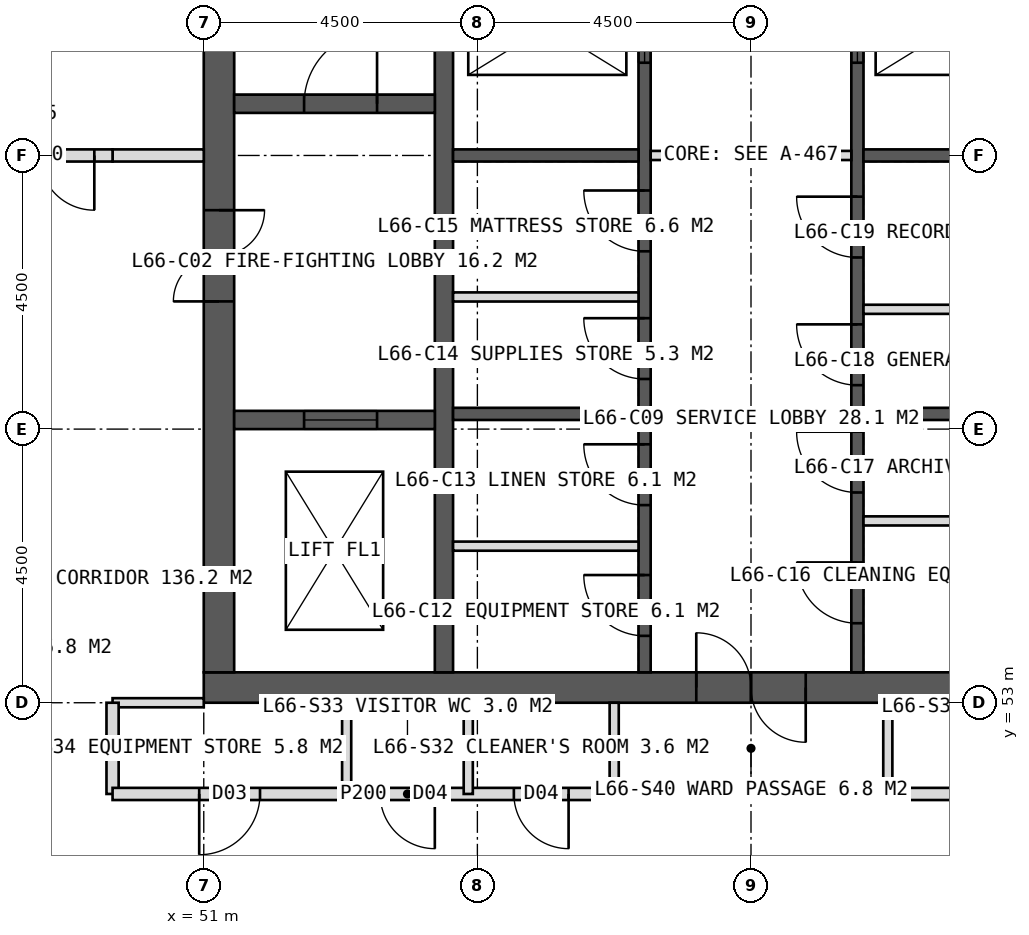
"""IFC4 building model, lengths in metres.
Left out: names, types, materials, properties, quantities, classifications, styles, units other than length and angle.
Written with IfcOpenShell. Run it as: python <this file> out.ifc"""

import sys

from ifc_helpers import new_model, si_unit, direction, frame, frame_2d, origin, place, context, subcontext, project, spatial, rectangle, extrude, element, fill, save


model = new_model("IFC4")
c1 = context("Model", 3, precision=1e-05, world=origin(), true_north=direction((0.0, 1.0)))
c2 = subcontext(c1, "Body", "Model", "MODEL_VIEW")
j1 = project(units=[si_unit("LENGTHUNIT", "METRE"), si_unit("PLANEANGLEUNIT", "RADIAN")], contexts=[c1])
p1 = place(None, origin())
s1 = spatial("IfcSite", under=j1, at=p1, CompositionType="ELEMENT")
p2 = place(p1, origin())
s2 = spatial("IfcBuilding", under=s1, at=p2, CompositionType="ELEMENT")
p3 = place(p2, frame((0.0, 0.0, 274.0)))
s3 = spatial("IfcBuildingStorey", under=s2, at=p3, CompositionType="ELEMENT", Elevation=274.0)
p4 = place(p3, frame((51.0, 53.25, 0.0), z_axis=(0.0, 0.0, 1.0), x_axis=(1.0, 0.0, 0.0)))
e1 = element("IfcWall", 1, at=p4, inside=s3, PredefinedType="SHEAR", context=c2, shape_type="SweptSolid", body=[
    extrude(rectangle(XDim=18.0, YDim=0.5, at=frame_2d((9.0, 0.0))), origin(), (0.0, 0.0, 1.0), 4.0),
])
p5 = place(p4, frame((8.1, 0.0, 0.0)))
e2 = element("IfcOpeningElement", 2, at=p5, cuts=e1, PredefinedType="OPENING", context=c2, shape_type="SweptSolid", body=[
    extrude(rectangle(XDim=1.8, YDim=2.2, at=frame_2d((0.9, 1.1))), frame((0.0, 0.26, 0.0), z_axis=(0.0, -1.0, 0.0), x_axis=(1.0, 0.0, 0.0)), (0.0, 0.0, 1.0), 0.52),
])
p6 = place(p3, frame((51.25, 53.5, 0.0), z_axis=(0.0, 0.0, 1.0), x_axis=(0.0, 1.0, 0.0)))
e3 = element("IfcWall", 3, at=p6, inside=s3, PredefinedType="SHEAR", context=c2, shape_type="SweptSolid", body=[
    extrude(rectangle(XDim=17.0, YDim=0.5, at=frame_2d((8.5, 0.0))), origin(), (0.0, 0.0, 1.0), 4.0),
])
p7 = place(p6, frame((6.1, 0.0, 0.0)))
e4 = element("IfcOpeningElement", 4, at=p7, cuts=e3, PredefinedType="OPENING", context=c2, shape_type="SweptSolid", body=[
    extrude(rectangle(XDim=1.5, YDim=2.2, at=frame_2d((0.75, 1.1))), frame((0.0, 0.26, 0.0), z_axis=(0.0, -1.0, 0.0), x_axis=(1.0, 0.0, 0.0)), (0.0, 0.0, 1.0), 0.52),
])
p8 = place(p3, frame((54.95, 53.5, 0.0), z_axis=(0.0, 0.0, 1.0), x_axis=(0.0, 1.0, 0.0)))
e5 = element("IfcWall", 5, at=p8, inside=s3, PredefinedType="SHEAR", context=c2, shape_type="SweptSolid", body=[
    extrude(rectangle(XDim=17.0, YDim=0.3, at=frame_2d((8.5, 0.0))), origin(), (0.0, 0.0, 1.0), 4.0),
])
p9 = place(p3, frame((58.25, 53.5, 0.0), z_axis=(0.0, 0.0, 1.0), x_axis=(0.0, 1.0, 0.0)))
e6 = element("IfcWall", 6, at=p9, inside=s3, PredefinedType="SHEAR", context=c2, shape_type="SweptSolid", body=[
    extrude(rectangle(XDim=17.0, YDim=0.2, at=frame_2d((8.5, 0.0))), origin(), (0.0, 0.0, 1.0), 4.0),
])
p10 = place(p9, frame((0.6, 0.0, 0.0)))
e7 = element("IfcOpeningElement", 7, at=p10, cuts=e6, PredefinedType="OPENING", context=c2, shape_type="SweptSolid", body=[
    extrude(rectangle(XDim=1.0, YDim=2.1, at=frame_2d((0.5, 1.05))), frame((0.0, 0.11, 0.0), z_axis=(0.0, -1.0, 0.0), x_axis=(1.0, 0.0, 0.0)), (0.0, 0.0, 1.0), 0.22),
])
p11 = place(p9, frame((2.75, 0.0, 0.0)))
e8 = element("IfcOpeningElement", 8, at=p11, cuts=e6, PredefinedType="OPENING", context=c2, shape_type="SweptSolid", body=[
    extrude(rectangle(XDim=1.0, YDim=2.1, at=frame_2d((0.5, 1.05))), frame((0.0, 0.11, 0.0), z_axis=(0.0, -1.0, 0.0), x_axis=(1.0, 0.0, 0.0)), (0.0, 0.0, 1.0), 0.22),
])
p12 = place(p9, frame((4.824, 0.0, 0.0)))
e9 = element("IfcOpeningElement", 9, at=p12, cuts=e6, PredefinedType="OPENING", context=c2, shape_type="SweptSolid", body=[
    extrude(rectangle(XDim=1.0, YDim=2.1, at=frame_2d((0.5, 1.05))), frame((0.0, 0.11, 0.0), z_axis=(0.0, -1.0, 0.0), x_axis=(1.0, 0.0, 0.0)), (0.0, 0.0, 1.0), 0.22),
])
p13 = place(p9, frame((6.924, 0.0, 0.0)))
e10 = element("IfcOpeningElement", 10, at=p13, cuts=e6, PredefinedType="OPENING", context=c2, shape_type="SweptSolid", body=[
    extrude(rectangle(XDim=1.0, YDim=2.1, at=frame_2d((0.5, 1.05))), frame((0.0, 0.11, 0.0), z_axis=(0.0, -1.0, 0.0), x_axis=(1.0, 0.0, 0.0)), (0.0, 0.0, 1.0), 0.22),
])
p14 = place(p9, frame((10.025, 0.0, 0.0)))
e11 = element("IfcOpeningElement", 11, at=p14, cuts=e6, PredefinedType="OPENING", context=c2, shape_type="SweptSolid", body=[
    extrude(rectangle(XDim=1.4, YDim=2.2, at=frame_2d((0.7, 1.1))), frame((0.0, 0.11, 0.0), z_axis=(0.0, -1.0, 0.0), x_axis=(1.0, 0.0, 0.0)), (0.0, 0.0, 1.0), 0.22),
])
p15 = place(p9, frame((14.325, 0.0, 0.0)))
e12 = element("IfcOpeningElement", 12, at=p15, cuts=e6, PredefinedType="OPENING", context=c2, shape_type="SweptSolid", body=[
    extrude(rectangle(XDim=1.4, YDim=2.2, at=frame_2d((0.7, 1.1))), frame((0.0, 0.11, 0.0), z_axis=(0.0, -1.0, 0.0), x_axis=(1.0, 0.0, 0.0)), (0.0, 0.0, 1.0), 0.22),
])
p16 = place(p3, frame((61.75, 53.5, 0.0), z_axis=(0.0, 0.0, 1.0), x_axis=(0.0, 1.0, 0.0)))
e13 = element("IfcWall", 13, at=p16, inside=s3, PredefinedType="SHEAR", context=c2, shape_type="SweptSolid", body=[
    extrude(rectangle(XDim=17.0, YDim=0.2, at=frame_2d((8.5, 0.0))), origin(), (0.0, 0.0, 1.0), 4.0),
])
p17 = place(p16, frame((0.808, 0.0, 0.0)))
e14 = element("IfcOpeningElement", 14, at=p17, cuts=e13, PredefinedType="OPENING", context=c2, shape_type="SweptSolid", body=[
    extrude(rectangle(XDim=1.0, YDim=2.1, at=frame_2d((0.5, 1.05))), frame((0.0, 0.11, 0.0), z_axis=(0.0, -1.0, 0.0), x_axis=(1.0, 0.0, 0.0)), (0.0, 0.0, 1.0), 0.22),
])
p18 = place(p16, frame((2.958, 0.0, 0.0)))
e15 = element("IfcOpeningElement", 15, at=p18, cuts=e13, PredefinedType="OPENING", context=c2, shape_type="SweptSolid", body=[
    extrude(rectangle(XDim=1.0, YDim=2.1, at=frame_2d((0.5, 1.05))), frame((0.0, 0.11, 0.0), z_axis=(0.0, -1.0, 0.0), x_axis=(1.0, 0.0, 0.0)), (0.0, 0.0, 1.0), 0.22),
])
p19 = place(p16, frame((4.722, 0.0, 0.0)))
e16 = element("IfcOpeningElement", 16, at=p19, cuts=e13, PredefinedType="OPENING", context=c2, shape_type="SweptSolid", body=[
    extrude(rectangle(XDim=1.0, YDim=2.1, at=frame_2d((0.5, 1.05))), frame((0.0, 0.11, 0.0), z_axis=(0.0, -1.0, 0.0), x_axis=(1.0, 0.0, 0.0)), (0.0, 0.0, 1.0), 0.22),
])
p20 = place(p16, frame((6.823, 0.0, 0.0)))
e17 = element("IfcOpeningElement", 17, at=p20, cuts=e13, PredefinedType="OPENING", context=c2, shape_type="SweptSolid", body=[
    extrude(rectangle(XDim=1.0, YDim=2.1, at=frame_2d((0.5, 1.05))), frame((0.0, 0.11, 0.0), z_axis=(0.0, -1.0, 0.0), x_axis=(1.0, 0.0, 0.0)), (0.0, 0.0, 1.0), 0.22),
])
p21 = place(p16, frame((10.025, 0.0, 0.0)))
e18 = element("IfcOpeningElement", 18, at=p21, cuts=e13, PredefinedType="OPENING", context=c2, shape_type="SweptSolid", body=[
    extrude(rectangle(XDim=1.4, YDim=2.2, at=frame_2d((0.7, 1.1))), frame((0.0, 0.11, 0.0), z_axis=(0.0, -1.0, 0.0), x_axis=(1.0, 0.0, 0.0)), (0.0, 0.0, 1.0), 0.22),
])
p22 = place(p16, frame((14.325, 0.0, 0.0)))
e19 = element("IfcOpeningElement", 19, at=p22, cuts=e13, PredefinedType="OPENING", context=c2, shape_type="SweptSolid", body=[
    extrude(rectangle(XDim=1.4, YDim=2.2, at=frame_2d((0.7, 1.1))), frame((0.0, 0.11, 0.0), z_axis=(0.0, -1.0, 0.0), x_axis=(1.0, 0.0, 0.0)), (0.0, 0.0, 1.0), 0.22),
])
for number, where, z_axis, x_axis in (
    (20, (55.1, 57.75, 0.0), (0.0, 0.0, 1.0), (1.0, 0.0, 0.0)),
    (21, (61.85, 57.75, 0.0), (0.0, 0.0, 1.0), (1.0, 0.0, 0.0)),
    (22, (55.1, 62.0, 0.0), (0.0, 0.0, 1.0), (1.0, 0.0, 0.0)),
    (23, (61.85, 62.0, 0.0), (0.0, 0.0, 1.0), (1.0, 0.0, 0.0)),
):
    element("IfcWall", number, at=place(p3, frame(where, z_axis=z_axis, x_axis=x_axis)), inside=s3, PredefinedType="SHEAR", context=c2, shape_type="SweptSolid", body=[
        extrude(rectangle(XDim=3.05, YDim=0.2, at=frame_2d((1.525, 0.0))), origin(), (0.0, 0.0, 1.0), 4.0),
    ])
p23 = place(p3, frame((51.5, 62.85, 0.0), z_axis=(0.0, 0.0, 1.0), x_axis=(1.0, 0.0, 0.0)))
e24 = element("IfcWall", 24, at=p23, inside=s3, PredefinedType="SHEAR", context=c2, shape_type="SweptSolid", body=[
    extrude(rectangle(XDim=3.3, YDim=0.3, at=frame_2d((1.65, 0.0))), origin(), (0.0, 0.0, 1.0), 4.0),
])
p24 = place(p23, frame((1.15, 0.0, 0.0)))
e25 = element("IfcOpeningElement", 25, at=p24, cuts=e24, PredefinedType="OPENING", context=c2, shape_type="SweptSolid", body=[
    extrude(rectangle(XDim=1.2, YDim=2.1, at=frame_2d((0.6, 1.05))), frame((0.0, 0.16, 0.0), z_axis=(0.0, -1.0, 0.0), x_axis=(1.0, 0.0, 0.0)), (0.0, 0.0, 1.0), 0.32),
])
p25 = place(p3, frame((51.5, 57.65, 0.0), z_axis=(0.0, 0.0, 1.0), x_axis=(1.0, 0.0, 0.0)))
e26 = element("IfcWall", 26, at=p25, inside=s3, PredefinedType="SHEAR", context=c2, shape_type="SweptSolid", body=[
    extrude(rectangle(XDim=3.3, YDim=0.3, at=frame_2d((1.65, 0.0))), origin(), (0.0, 0.0, 1.0), 4.0),
])
p26 = place(p25, frame((1.15, 0.0, 0.0)))
e27 = element("IfcOpeningElement", 27, at=p26, cuts=e26, PredefinedType="OPENING", context=c2, shape_type="SweptSolid", body=[
    extrude(rectangle(XDim=1.2, YDim=2.2, at=frame_2d((0.6, 1.1))), frame((0.0, 0.16, 0.0), z_axis=(0.0, -1.0, 0.0), x_axis=(1.0, 0.0, 0.0)), (0.0, 0.0, 1.0), 0.32),
])
p27 = place(p3, frame((51.0, 53.0, 0.0), z_axis=(0.0, 0.0, 1.0), x_axis=(-1.0, 0.0, 0.0)))
e28 = element("IfcWall", 28, at=p27, inside=s3, PredefinedType="PARTITIONING", context=c2, shape_type="SweptSolid", body=[
    extrude(rectangle(XDim=1.5, YDim=0.15, at=frame_2d((0.75, 0.0))), origin(), (0.0, 0.0, 1.0), 3.75),
])
p28 = place(p3, frame((51.0, 62.0, 0.0), z_axis=(0.0, 0.0, 1.0), x_axis=(-1.0, 0.0, 0.0)))
e29 = element("IfcWall", 29, at=p28, inside=s3, PredefinedType="SOLIDWALL", context=c2, shape_type="SweptSolid", body=[
    extrude(rectangle(XDim=1.5, YDim=0.2, at=frame_2d((0.75, 0.0))), origin(), (0.0, 0.0, 1.0), 2.75),
])
p29 = place(p3, frame((49.5, 51.5, 0.0), z_axis=(0.0, 0.0, 1.0), x_axis=(0.0, 1.0, 0.0)))
e30 = element("IfcWall", 30, at=p29, inside=s3, PredefinedType="PARTITIONING", context=c2, shape_type="SweptSolid", body=[
    extrude(rectangle(XDim=1.5, YDim=0.2, at=frame_2d((0.75, 0.0))), origin(), (0.0, 0.0, 1.0), 3.75),
])
p30 = place(p3, frame((70.5, 51.5, 0.0), z_axis=(0.0, 0.0, 1.0), x_axis=(-1.0, 0.0, 0.0)))
e31 = element("IfcWall", 31, at=p30, inside=s3, PredefinedType="PARTITIONING", context=c2, shape_type="SweptSolid", body=[
    extrude(rectangle(XDim=8.25, YDim=0.2, at=frame_2d((4.125, 0.0))), origin(), (0.0, 0.0, 1.0), 3.75),
])
p31 = place(p30, frame((2.05, 0.0, 0.0)))
e32 = element("IfcOpeningElement", 32, at=p31, cuts=e31, PredefinedType="OPENING", context=c2, shape_type="SweptSolid", body=[
    extrude(rectangle(XDim=0.9, YDim=2.1, at=frame_2d((0.45, 1.05))), frame((0.0, 0.11, 0.0), z_axis=(0.0, -1.0, 0.0), x_axis=(1.0, 0.0, 0.0)), (0.0, 0.0, 1.0), 0.22),
])
p32 = place(p30, frame((5.375, 0.0, 0.0)))
e33 = element("IfcOpeningElement", 33, at=p32, cuts=e31, PredefinedType="OPENING", context=c2, shape_type="SweptSolid", body=[
    extrude(rectangle(XDim=1.0, YDim=2.1, at=frame_2d((0.5, 1.05))), frame((0.0, 0.11, 0.0), z_axis=(0.0, -1.0, 0.0), x_axis=(1.0, 0.0, 0.0)), (0.0, 0.0, 1.0), 0.22),
])
p33 = place(p3, frame((57.75, 51.5, 0.0), z_axis=(0.0, 0.0, 1.0), x_axis=(-1.0, 0.0, 0.0)))
e34 = element("IfcWall", 34, at=p33, inside=s3, PredefinedType="PARTITIONING", context=c2, shape_type="SweptSolid", body=[
    extrude(rectangle(XDim=8.25, YDim=0.2, at=frame_2d((4.125, 0.0))), origin(), (0.0, 0.0, 1.0), 3.75),
])
p34 = place(p33, frame((0.75, 0.0, 0.0)))
e35 = element("IfcOpeningElement", 35, at=p34, cuts=e34, PredefinedType="OPENING", context=c2, shape_type="SweptSolid", body=[
    extrude(rectangle(XDim=0.9, YDim=2.1, at=frame_2d((0.45, 1.05))), frame((0.0, 0.11, 0.0), z_axis=(0.0, -1.0, 0.0), x_axis=(1.0, 0.0, 0.0)), (0.0, 0.0, 1.0), 0.22),
])
p35 = place(p33, frame((2.95, 0.0, 0.0)))
e36 = element("IfcOpeningElement", 36, at=p35, cuts=e34, PredefinedType="OPENING", context=c2, shape_type="SweptSolid", body=[
    extrude(rectangle(XDim=0.9, YDim=2.1, at=frame_2d((0.45, 1.05))), frame((0.0, 0.11, 0.0), z_axis=(0.0, -1.0, 0.0), x_axis=(1.0, 0.0, 0.0)), (0.0, 0.0, 1.0), 0.22),
])
p36 = place(p33, frame((5.825, 0.0, 0.0)))
e37 = element("IfcOpeningElement", 37, at=p36, cuts=e34, PredefinedType="OPENING", context=c2, shape_type="SweptSolid", body=[
    extrude(rectangle(XDim=1.0, YDim=2.1, at=frame_2d((0.5, 1.05))), frame((0.0, 0.11, 0.0), z_axis=(0.0, -1.0, 0.0), x_axis=(1.0, 0.0, 0.0)), (0.0, 0.0, 1.0), 0.22),
])
for number, where, z_axis, x_axis in (
    (38, (62.25, 53.0, 0.0), (0.0, 0.0, 1.0), (0.0, -1.0, 0.0)),
    (39, (57.75, 53.0, 0.0), (0.0, 0.0, 1.0), (0.0, -1.0, 0.0)),
):
    element("IfcWall", number, at=place(p3, frame(where, z_axis=z_axis, x_axis=x_axis)), inside=s3, PredefinedType="PARTITIONING", context=c2, shape_type="SweptSolid", body=[
        extrude(rectangle(XDim=1.5, YDim=0.15, at=frame_2d((0.75, 0.0))), origin(), (0.0, 0.0, 1.0), 3.75),
    ])
p37 = place(p3, frame((55.35, 53.0, 0.0), z_axis=(0.0, 0.0, 1.0), x_axis=(0.0, -1.0, 0.0)))
e40 = element("IfcWall", 40, at=p37, inside=s3, PredefinedType="PARTITIONING", context=c2, shape_type="SweptSolid", body=[
    extrude(rectangle(XDim=1.5, YDim=0.15, at=frame_2d((0.75, 0.0))), origin(), (0.0, 0.0, 1.0), 2.95),
])
p38 = place(p3, frame((53.35, 53.0, 0.0), z_axis=(0.0, 0.0, 1.0), x_axis=(0.0, -1.0, 0.0)))
e41 = element("IfcWall", 41, at=p38, inside=s3, PredefinedType="PARTITIONING", context=c2, shape_type="SweptSolid", body=[
    extrude(rectangle(XDim=1.5, YDim=0.15, at=frame_2d((0.75, 0.0))), origin(), (0.0, 0.0, 1.0), 3.75),
])
p39 = place(p3, frame((49.5, 62.0, 0.0), z_axis=(0.0, 0.0, 1.0), x_axis=(-1.0, 0.0, 0.0)))
e42 = element("IfcWall", 42, at=p39, inside=s3, PredefinedType="SOLIDWALL", context=c2, shape_type="SweptSolid", body=[
    extrude(rectangle(XDim=2.6, YDim=0.2, at=frame_2d((1.3, 0.0))), origin(), (0.0, 0.0, 1.0), 2.75),
])
p40 = place(p39, frame((0.3, 0.0, 0.0)))
e43 = element("IfcOpeningElement", 43, at=p40, cuts=e42, PredefinedType="OPENING", context=c2, shape_type="SweptSolid", body=[
    extrude(rectangle(XDim=1.8, YDim=2.2, at=frame_2d((0.9, 1.1))), frame((0.0, 0.11, 0.0), z_axis=(0.0, -1.0, 0.0), x_axis=(1.0, 0.0, 0.0)), (0.0, 0.0, 1.0), 0.22),
])
for number, where, z_axis, x_axis in (
    (44, (55.1, 55.575, 0.0), (0.0, 0.0, 1.0), (1.0, 0.0, 0.0)),
    (45, (61.85, 55.99, 0.0), (0.0, 0.0, 1.0), (1.0, 0.0, 0.0)),
    (46, (55.1, 59.673, 0.0), (0.0, 0.0, 1.0), (1.0, 0.0, 0.0)),
    (47, (61.85, 59.47, 0.0), (0.0, 0.0, 1.0), (1.0, 0.0, 0.0)),
):
    element("IfcWall", number, at=place(p3, frame(where, z_axis=z_axis, x_axis=x_axis)), inside=s3, PredefinedType="PARTITIONING", context=c2, shape_type="SweptSolid", body=[
        extrude(rectangle(XDim=3.05, YDim=0.15, at=frame_2d((1.525, 0.0))), origin(), (0.0, 0.0, 1.0), 3.75),
    ])
p41 = place(p3, frame((58.35, 62.0, 0.0), z_axis=(0.0, 0.0, 1.0), x_axis=(1.0, 0.0, 0.0)))
e48 = element("IfcWall", 48, at=p41, inside=s3, PredefinedType="PARTITIONING", context=c2, shape_type="SweptSolid", body=[
    extrude(rectangle(XDim=3.3, YDim=0.15, at=frame_2d((1.65, 0.0))), origin(), (0.0, 0.0, 1.0), 3.75),
])
p42 = place(p34, origin())
e49 = element("IfcDoor", 49, at=p42, inside=s3, OperationType="SINGLE_SWING_LEFT", PredefinedType="DOOR", context=c2, shape_type="SweptSolid", body=[
    extrude(rectangle(XDim=0.9, YDim=2.1, at=frame_2d((0.45, 1.05))), frame((0.0, 0.025, 0.0), z_axis=(0.0, -1.0, 0.0), x_axis=(1.0, 0.0, 0.0)), (0.0, 0.0, 1.0), 0.05),
])
fill(e35, e49)
p43 = place(p35, origin())
e50 = element("IfcDoor", 50, at=p43, inside=s3, OperationType="SINGLE_SWING_LEFT", PredefinedType="DOOR", context=c2, shape_type="SweptSolid", body=[
    extrude(rectangle(XDim=0.9, YDim=2.1, at=frame_2d((0.45, 1.05))), frame((0.0, 0.025, 0.0), z_axis=(0.0, -1.0, 0.0), x_axis=(1.0, 0.0, 0.0)), (0.0, 0.0, 1.0), 0.05),
])
fill(e36, e50)
p44 = place(p36, origin())
e51 = element("IfcDoor", 51, at=p44, inside=s3, OperationType="SINGLE_SWING_RIGHT", PredefinedType="DOOR", context=c2, shape_type="SweptSolid", body=[
    extrude(rectangle(XDim=1.0, YDim=2.1, at=frame_2d((0.5, 1.05))), frame((0.0, 0.025, 0.0), z_axis=(0.0, -1.0, 0.0), x_axis=(1.0, 0.0, 0.0)), (0.0, 0.0, 1.0), 0.05),
])
fill(e37, e51)
p45 = place(p40, origin())
e52 = element("IfcDoor", 52, at=p45, inside=s3, OperationType="DOUBLE_DOOR_DOUBLE_SWING", PredefinedType="DOOR", context=c2, shape_type="SweptSolid", body=[
    extrude(rectangle(XDim=1.8, YDim=2.2, at=frame_2d((0.9, 1.1))), frame((0.0, 0.025, 0.0), z_axis=(0.0, -1.0, 0.0), x_axis=(1.0, 0.0, 0.0)), (0.0, 0.0, 1.0), 0.05),
])
fill(e43, e52)
p46 = place(p7, origin())
e53 = element("IfcDoor", 53, at=p46, inside=s3, OperationType="DOUBLE_DOOR_SINGLE_SWING", PredefinedType="DOOR", context=c2, shape_type="SweptSolid", body=[
    extrude(rectangle(XDim=1.5, YDim=2.2, at=frame_2d((0.75, 1.1))), frame((0.0, 0.025, 0.0), z_axis=(0.0, -1.0, 0.0), x_axis=(1.0, 0.0, 0.0)), (0.0, 0.0, 1.0), 0.05),
])
fill(e4, e53)
p47 = place(p24, origin())
e54 = element("IfcDoor", 54, at=p47, inside=s3, OperationType="SINGLE_SWING_RIGHT", PredefinedType="DOOR", context=c2, shape_type="SweptSolid", body=[
    extrude(rectangle(XDim=1.2, YDim=2.1, at=frame_2d((0.6, 1.05))), frame((0.0, 0.025, 0.0), z_axis=(0.0, -1.0, 0.0), x_axis=(1.0, 0.0, 0.0)), (0.0, 0.0, 1.0), 0.05),
])
fill(e25, e54)
p48 = place(p26, origin())
e55 = element("IfcDoor", 55, at=p48, inside=s3, OperationType="SLIDING_TO_LEFT", PredefinedType="DOOR", context=c2, shape_type="SweptSolid", body=[
    extrude(rectangle(XDim=1.2, YDim=2.2, at=frame_2d((0.6, 1.1))), frame((0.0, 0.025, 0.0), z_axis=(0.0, -1.0, 0.0), x_axis=(1.0, 0.0, 0.0)), (0.0, 0.0, 1.0), 0.05),
])
fill(e27, e55)
p49 = place(p10, origin())
e56 = element("IfcDoor", 56, at=p49, inside=s3, OperationType="SINGLE_SWING_RIGHT", PredefinedType="DOOR", context=c2, shape_type="SweptSolid", body=[
    extrude(rectangle(XDim=1.0, YDim=2.1, at=frame_2d((0.5, 1.05))), frame((0.0, 0.025, 0.0), z_axis=(0.0, -1.0, 0.0), x_axis=(1.0, 0.0, 0.0)), (0.0, 0.0, 1.0), 0.05),
])
fill(e7, e56)
p50 = place(p11, origin())
e57 = element("IfcDoor", 57, at=p50, inside=s3, OperationType="SINGLE_SWING_RIGHT", PredefinedType="DOOR", context=c2, shape_type="SweptSolid", body=[
    extrude(rectangle(XDim=1.0, YDim=2.1, at=frame_2d((0.5, 1.05))), frame((0.0, 0.025, 0.0), z_axis=(0.0, -1.0, 0.0), x_axis=(1.0, 0.0, 0.0)), (0.0, 0.0, 1.0), 0.05),
])
fill(e8, e57)
p51 = place(p17, origin())
e58 = element("IfcDoor", 58, at=p51, inside=s3, OperationType="SINGLE_SWING_RIGHT", PredefinedType="DOOR", context=c2, shape_type="SweptSolid", body=[
    extrude(rectangle(XDim=1.0, YDim=2.1, at=frame_2d((0.5, 1.05))), frame((0.0, 0.025, 0.0), z_axis=(0.0, -1.0, 0.0), x_axis=(1.0, 0.0, 0.0)), (0.0, 0.0, 1.0), 0.05),
])
fill(e14, e58)
p52 = place(p18, origin())
e59 = element("IfcDoor", 59, at=p52, inside=s3, OperationType="SINGLE_SWING_RIGHT", PredefinedType="DOOR", context=c2, shape_type="SweptSolid", body=[
    extrude(rectangle(XDim=1.0, YDim=2.1, at=frame_2d((0.5, 1.05))), frame((0.0, 0.025, 0.0), z_axis=(0.0, -1.0, 0.0), x_axis=(1.0, 0.0, 0.0)), (0.0, 0.0, 1.0), 0.05),
])
fill(e15, e59)
p53 = place(p12, origin())
e60 = element("IfcDoor", 60, at=p53, inside=s3, OperationType="SINGLE_SWING_RIGHT", PredefinedType="DOOR", context=c2, shape_type="SweptSolid", body=[
    extrude(rectangle(XDim=1.0, YDim=2.1, at=frame_2d((0.5, 1.05))), frame((0.0, 0.025, 0.0), z_axis=(0.0, -1.0, 0.0), x_axis=(1.0, 0.0, 0.0)), (0.0, 0.0, 1.0), 0.05),
])
fill(e9, e60)
p54 = place(p13, origin())
e61 = element("IfcDoor", 61, at=p54, inside=s3, OperationType="SINGLE_SWING_RIGHT", PredefinedType="DOOR", context=c2, shape_type="SweptSolid", body=[
    extrude(rectangle(XDim=1.0, YDim=2.1, at=frame_2d((0.5, 1.05))), frame((0.0, 0.025, 0.0), z_axis=(0.0, -1.0, 0.0), x_axis=(1.0, 0.0, 0.0)), (0.0, 0.0, 1.0), 0.05),
])
fill(e10, e61)
p55 = place(p19, origin())
e62 = element("IfcDoor", 62, at=p55, inside=s3, OperationType="SINGLE_SWING_RIGHT", PredefinedType="DOOR", context=c2, shape_type="SweptSolid", body=[
    extrude(rectangle(XDim=1.0, YDim=2.1, at=frame_2d((0.5, 1.05))), frame((0.0, 0.025, 0.0), z_axis=(0.0, -1.0, 0.0), x_axis=(1.0, 0.0, 0.0)), (0.0, 0.0, 1.0), 0.05),
])
fill(e16, e62)
p56 = place(p20, origin())
e63 = element("IfcDoor", 63, at=p56, inside=s3, OperationType="SINGLE_SWING_RIGHT", PredefinedType="DOOR", context=c2, shape_type="SweptSolid", body=[
    extrude(rectangle(XDim=1.0, YDim=2.1, at=frame_2d((0.5, 1.05))), frame((0.0, 0.025, 0.0), z_axis=(0.0, -1.0, 0.0), x_axis=(1.0, 0.0, 0.0)), (0.0, 0.0, 1.0), 0.05),
])
fill(e17, e63)
p57 = place(p14, origin())
e64 = element("IfcDoor", 64, at=p57, inside=s3, OperationType="SLIDING_TO_LEFT", PredefinedType="DOOR", context=c2, shape_type="SweptSolid", body=[
    extrude(rectangle(XDim=1.4, YDim=2.2, at=frame_2d((0.7, 1.1))), frame((0.0, 0.025, 0.0), z_axis=(0.0, -1.0, 0.0), x_axis=(1.0, 0.0, 0.0)), (0.0, 0.0, 1.0), 0.05),
])
fill(e11, e64)
p58 = place(p21, origin())
e65 = element("IfcDoor", 65, at=p58, inside=s3, OperationType="SLIDING_TO_LEFT", PredefinedType="DOOR", context=c2, shape_type="SweptSolid", body=[
    extrude(rectangle(XDim=1.4, YDim=2.2, at=frame_2d((0.7, 1.1))), frame((0.0, 0.025, 0.0), z_axis=(0.0, -1.0, 0.0), x_axis=(1.0, 0.0, 0.0)), (0.0, 0.0, 1.0), 0.05),
])
fill(e18, e65)
p59 = place(p5, origin())
e66 = element("IfcDoor", 66, at=p59, inside=s3, OperationType="DOUBLE_DOOR_SINGLE_SWING", PredefinedType="DOOR", context=c2, shape_type="SweptSolid", body=[
    extrude(rectangle(XDim=1.8, YDim=2.2, at=frame_2d((0.9, 1.1))), frame((0.0, 0.025, 0.0), z_axis=(0.0, -1.0, 0.0), x_axis=(1.0, 0.0, 0.0)), (0.0, 0.0, 1.0), 0.05),
])
fill(e2, e66)
save(model, sys.argv[1])
